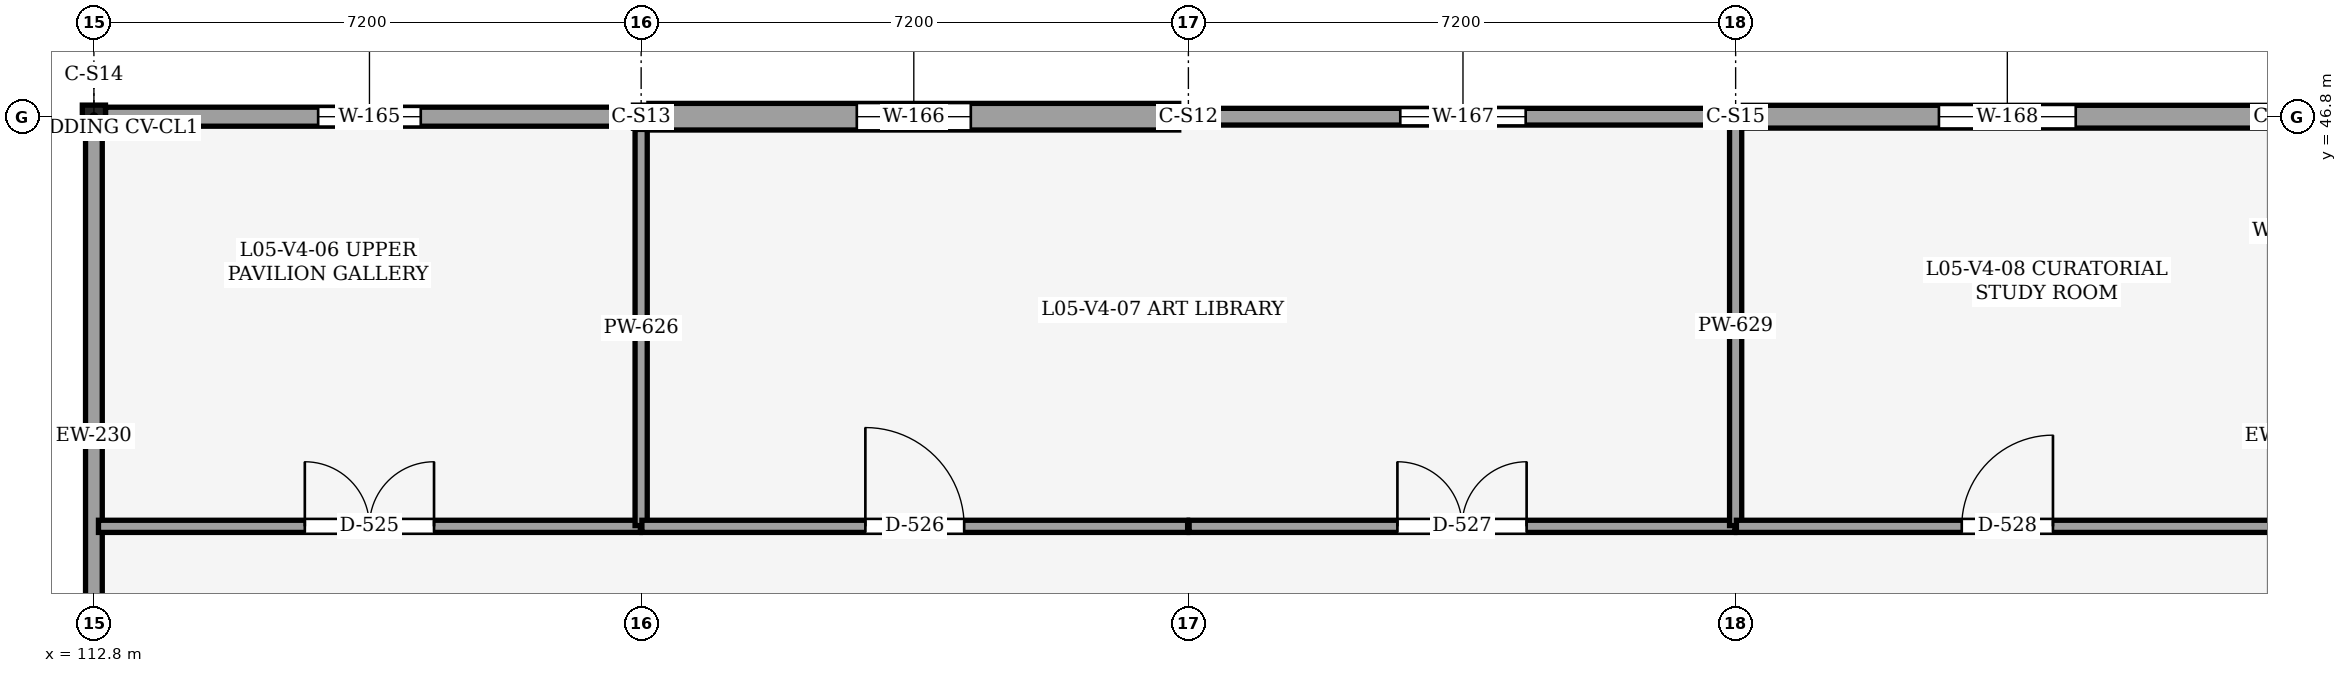
"""IFC4 building model, lengths in metres.
Left out: names, types, materials, properties, quantities, classifications, styles, units other than length and angle.
Written with IfcOpenShell. Run it as: python <this file> out.ifc"""

import sys

from ifc_helpers import new_model, si_unit, direction, frame, frame_2d, origin, origin_2d, place, context, subcontext, project, spatial, rectangle, hollow_rectangle, extrude, element, fill, save


model = new_model("IFC4")
c1 = context("Model", 3, precision=1e-05, world=origin(), true_north=direction((0.0, 1.0)))
c2 = subcontext(c1, "Body", "Model", "MODEL_VIEW")
j1 = project(units=[si_unit("LENGTHUNIT", "METRE"), si_unit("PLANEANGLEUNIT", "RADIAN")], contexts=[c1])
p1 = place(None, origin())
s1 = spatial("IfcSite", under=j1, at=p1, CompositionType="ELEMENT")
p2 = place(p1, origin())
s2 = spatial("IfcBuilding", under=s1, at=p2, CompositionType="ELEMENT")
p3 = place(p2, frame((0.0, 0.0, 24.6)))
s3 = spatial("IfcBuildingStorey", under=s2, at=p3, CompositionType="ELEMENT", Elevation=24.6)
p4 = place(p3, frame((112.8, 46.8, 0.0), z_axis=(0.0, 0.0, 1.0), x_axis=(1.0, 0.0, 0.0)))
e1 = element("IfcColumn", 1, at=p4, inside=s3, PredefinedType="COLUMN", context=c2, shape_type="SweptSolid", body=[
    extrude(hollow_rectangle(XDim=0.305, YDim=0.305, WallThickness=0.016, OuterFilletRadius=0.032, at=origin_2d()), origin(), (0.0, 0.0, 1.0), 4.8),
])
p5 = place(p3, frame((120.0, 46.8, 0.0), z_axis=(0.0, 0.0, 1.0), x_axis=(1.0, 0.0, 0.0)))
e2 = element("IfcColumn", 2, at=p5, inside=s3, PredefinedType="COLUMN", context=c2, shape_type="SweptSolid", body=[
    extrude(hollow_rectangle(XDim=0.203, YDim=0.305, WallThickness=0.013, OuterFilletRadius=0.025, at=origin_2d()), origin(), (0.0, 0.0, 1.0), 4.8),
])
p6 = place(p3, frame((127.2, 46.8, 0.0), z_axis=(0.0, 0.0, 1.0), x_axis=(1.0, 0.0, 0.0)))
e3 = element("IfcColumn", 3, at=p6, inside=s3, PredefinedType="COLUMN", context=c2, shape_type="SweptSolid", body=[
    extrude(hollow_rectangle(XDim=0.254, YDim=0.254, WallThickness=0.013, OuterFilletRadius=0.025, at=origin_2d()), origin(), (0.0, 0.0, 1.0), 4.8),
])
p7 = place(p3, frame((134.4, 46.8, 0.0), z_axis=(0.0, 0.0, 1.0), x_axis=(1.0, 0.0, 0.0)))
e4 = element("IfcColumn", 4, at=p7, inside=s3, PredefinedType="COLUMN", context=c2, shape_type="SweptSolid", body=[
    extrude(hollow_rectangle(XDim=0.203, YDim=0.203, WallThickness=0.013, OuterFilletRadius=0.025, at=origin_2d()), origin(), (0.0, 0.0, 1.0), 4.8),
])
p8 = place(p3, frame((112.952, 46.8, 0.0), z_axis=(0.0, 0.0, 1.0), x_axis=(1.0, 0.0, 0.0)))
e5 = element("IfcWall", 5, at=p8, inside=s3, PredefinedType="SOLIDWALL", context=c2, shape_type="SweptSolid", body=[
    extrude(rectangle(XDim=6.946, YDim=0.25, at=frame_2d((3.473, 0.0))), origin(), (0.0, 0.0, 1.0), 3.695),
])
p9 = place(p8, frame((2.798, 0.0, 0.9)))
e6 = element("IfcOpeningElement", 6, at=p9, cuts=e5, PredefinedType="OPENING", context=c2, shape_type="SweptSolid", body=[
    extrude(rectangle(XDim=1.35, YDim=1.5, at=frame_2d((0.675, 0.75))), frame((0.0, 0.135, 0.0), z_axis=(0.0, -1.0, 0.0), x_axis=(1.0, 0.0, 0.0)), (0.0, 0.0, 1.0), 0.271),
])
p10 = place(p3, frame((120.102, 46.8, 0.0), z_axis=(0.0, 0.0, 1.0), x_axis=(1.0, 0.0, 0.0)))
e7 = element("IfcWall", 7, at=p10, inside=s3, PredefinedType="SOLIDWALL", context=c2, shape_type="SweptSolid", body=[
    extrude(rectangle(XDim=6.971, YDim=0.35, at=frame_2d((3.486, 0.0))), origin(), (0.0, 0.0, 1.0), 3.695),
])
p11 = place(p10, frame((2.736, 0.0, 0.9)))
e8 = element("IfcOpeningElement", 8, at=p11, cuts=e7, PredefinedType="OPENING", context=c2, shape_type="SweptSolid", body=[
    extrude(rectangle(XDim=1.5, YDim=1.5, at=frame_2d((0.75, 0.75))), frame((0.0, 0.185, 0.0), z_axis=(0.0, -1.0, 0.0), x_axis=(1.0, 0.0, 0.0)), (0.0, 0.0, 1.0), 0.371),
])
p12 = place(p3, frame((127.327, 46.8, 0.0), z_axis=(0.0, 0.0, 1.0), x_axis=(1.0, 0.0, 0.0)))
e9 = element("IfcWall", 9, at=p12, inside=s3, PredefinedType="SOLIDWALL", context=c2, shape_type="SweptSolid", body=[
    extrude(rectangle(XDim=6.971, YDim=0.22, at=frame_2d((3.486, 0.0))), origin(), (0.0, 0.0, 1.0), 3.695),
])
p13 = place(p12, frame((2.661, 0.0, 0.9)))
e10 = element("IfcOpeningElement", 10, at=p13, cuts=e9, PredefinedType="OPENING", context=c2, shape_type="SweptSolid", body=[
    extrude(rectangle(XDim=1.65, YDim=1.5, at=frame_2d((0.825, 0.75))), frame((0.0, 0.12, 0.0), z_axis=(0.0, -1.0, 0.0), x_axis=(1.0, 0.0, 0.0)), (0.0, 0.0, 1.0), 0.24),
])
p14 = place(p3, frame((134.502, 46.8, 0.0), z_axis=(0.0, 0.0, 1.0), x_axis=(1.0, 0.0, 0.0)))
e11 = element("IfcWall", 11, at=p14, inside=s3, PredefinedType="SOLIDWALL", context=c2, shape_type="SweptSolid", body=[
    extrude(rectangle(XDim=6.946, YDim=0.3, at=frame_2d((3.473, 0.0))), origin(), (0.0, 0.0, 1.0), 3.695),
])
p15 = place(p14, frame((2.573, 0.0, 0.9)))
e12 = element("IfcOpeningElement", 12, at=p15, cuts=e11, PredefinedType="OPENING", context=c2, shape_type="SweptSolid", body=[
    extrude(rectangle(XDim=1.8, YDim=1.5, at=frame_2d((0.9, 0.75))), frame((0.0, 0.16, 0.0), z_axis=(0.0, -1.0, 0.0), x_axis=(1.0, 0.0, 0.0)), (0.0, 0.0, 1.0), 0.321),
])
p16 = place(p3, frame((112.8, 38.552, 0.0), z_axis=(0.0, 0.0, 1.0), x_axis=(0.0, 1.0, 0.0)))
e13 = element("IfcWall", 13, at=p16, inside=s3, PredefinedType="SOLIDWALL", context=c2, shape_type="SweptSolid", body=[
    extrude(rectangle(XDim=8.095, YDim=0.22, at=frame_2d((4.048, 0.0))), origin(), (0.0, 0.0, 1.0), 4.6),
])
p17 = place(p16, frame((0.75, 0.0, 0.9)))
e14 = element("IfcOpeningElement", 14, at=p17, cuts=e13, PredefinedType="OPENING", context=c2, shape_type="SweptSolid", body=[
    extrude(rectangle(XDim=1.2, YDim=1.5, at=frame_2d((0.6, 0.75))), frame((0.0, 0.12, 0.0), z_axis=(0.0, -1.0, 0.0), x_axis=(1.0, 0.0, 0.0)), (0.0, 0.0, 1.0), 0.24),
])
p18 = place(p3, frame((112.86, 41.41, 0.0), z_axis=(0.0, 0.0, 1.0), x_axis=(1.0, 0.0, 0.0)))
e15 = element("IfcWall", 15, at=p18, inside=s3, PredefinedType="PARTITIONING", context=c2, shape_type="SweptSolid", body=[
    extrude(rectangle(XDim=7.13, YDim=0.16, at=frame_2d((3.565, 0.0))), origin(), (0.0, 0.0, 1.0), 4.58),
])
p19 = place(p18, frame((2.715, 0.0, 0.0)))
e16 = element("IfcOpeningElement", 16, at=p19, cuts=e15, PredefinedType="OPENING", context=c2, shape_type="SweptSolid", body=[
    extrude(rectangle(XDim=1.7, YDim=2.4, at=frame_2d((0.85, 1.2))), frame((0.0, 0.09, 0.0), z_axis=(0.0, -1.0, 0.0), x_axis=(1.0, 0.0, 0.0)), (0.0, 0.0, 1.0), 0.18),
])
p20 = place(p3, frame((120.0, 41.42, 0.0), z_axis=(0.0, 0.0, 1.0), x_axis=(0.0, 1.0, 0.0)))
e17 = element("IfcWall", 17, at=p20, inside=s3, PredefinedType="PARTITIONING", context=c2, shape_type="SweptSolid", body=[
    extrude(rectangle(XDim=5.213, YDim=0.16, at=frame_2d((2.606, 0.0))), origin(), (0.0, 0.0, 1.0), 4.58),
])
p21 = place(p3, frame((120.01, 41.41, 0.0), z_axis=(0.0, 0.0, 1.0), x_axis=(1.0, 0.0, 0.0)))
e18 = element("IfcWall", 18, at=p21, inside=s3, PredefinedType="PARTITIONING", context=c2, shape_type="SweptSolid", body=[
    extrude(rectangle(XDim=7.18, YDim=0.16, at=frame_2d((3.59, 0.0))), origin(), (0.0, 0.0, 1.0), 4.58),
])
p22 = place(p21, frame((2.94, 0.0, 0.0)))
e19 = element("IfcOpeningElement", 19, at=p22, cuts=e18, PredefinedType="OPENING", context=c2, shape_type="SweptSolid", body=[
    extrude(rectangle(XDim=1.3, YDim=2.2, at=frame_2d((0.65, 1.1))), frame((0.0, 0.09, 0.0), z_axis=(0.0, -1.0, 0.0), x_axis=(1.0, 0.0, 0.0)), (0.0, 0.0, 1.0), 0.18),
])
p23 = place(p3, frame((127.21, 41.41, 0.0), z_axis=(0.0, 0.0, 1.0), x_axis=(1.0, 0.0, 0.0)))
e20 = element("IfcWall", 20, at=p23, inside=s3, PredefinedType="PARTITIONING", context=c2, shape_type="SweptSolid", body=[
    extrude(rectangle(XDim=7.18, YDim=0.16, at=frame_2d((3.59, 0.0))), origin(), (0.0, 0.0, 1.0), 4.58),
])
p24 = place(p23, frame((2.74, 0.0, 0.0)))
e21 = element("IfcOpeningElement", 21, at=p24, cuts=e20, PredefinedType="OPENING", context=c2, shape_type="SweptSolid", body=[
    extrude(rectangle(XDim=1.7, YDim=2.4, at=frame_2d((0.85, 1.2))), frame((0.0, 0.09, 0.0), z_axis=(0.0, -1.0, 0.0), x_axis=(1.0, 0.0, 0.0)), (0.0, 0.0, 1.0), 0.18),
])
p25 = place(p3, frame((134.4, 41.42, 0.0), z_axis=(0.0, 0.0, 1.0), x_axis=(0.0, 1.0, 0.0)))
e22 = element("IfcWall", 22, at=p25, inside=s3, PredefinedType="PARTITIONING", context=c2, shape_type="SweptSolid", body=[
    extrude(rectangle(XDim=5.263, YDim=0.16, at=frame_2d((2.632, 0.0))), origin(), (0.0, 0.0, 1.0), 4.58),
])
p26 = place(p3, frame((134.41, 41.41, 0.0), z_axis=(0.0, 0.0, 1.0), x_axis=(1.0, 0.0, 0.0)))
e23 = element("IfcWall", 23, at=p26, inside=s3, PredefinedType="PARTITIONING", context=c2, shape_type="SweptSolid", body=[
    extrude(rectangle(XDim=7.13, YDim=0.16, at=frame_2d((3.565, 0.0))), origin(), (0.0, 0.0, 1.0), 4.58),
])
p27 = place(p26, frame((2.965, 0.0, 0.0)))
e24 = element("IfcOpeningElement", 24, at=p27, cuts=e23, PredefinedType="OPENING", context=c2, shape_type="SweptSolid", body=[
    extrude(rectangle(XDim=1.2, YDim=2.2, at=frame_2d((0.6, 1.1))), frame((0.0, 0.09, 0.0), z_axis=(0.0, -1.0, 0.0), x_axis=(1.0, 0.0, 0.0)), (0.0, 0.0, 1.0), 0.18),
])
p28 = place(p9, origin())
e25 = element("IfcWindow", 25, at=p28, inside=s3, PartitioningType="SINGLE_PANEL", PredefinedType="WINDOW", context=c2, shape_type="SweptSolid", body=[
    extrude(rectangle(XDim=1.35, YDim=1.5, at=frame_2d((0.675, 0.75))), frame((0.0, 0.03, 0.0), z_axis=(0.0, -1.0, 0.0), x_axis=(1.0, 0.0, 0.0)), (0.0, 0.0, 1.0), 0.06),
])
fill(e6, e25)
p29 = place(p11, origin())
e26 = element("IfcWindow", 26, at=p29, inside=s3, PartitioningType="SINGLE_PANEL", PredefinedType="WINDOW", context=c2, shape_type="SweptSolid", body=[
    extrude(rectangle(XDim=1.5, YDim=1.5, at=frame_2d((0.75, 0.75))), frame((0.0, 0.03, 0.0), z_axis=(0.0, -1.0, 0.0), x_axis=(1.0, 0.0, 0.0)), (0.0, 0.0, 1.0), 0.06),
])
fill(e8, e26)
p30 = place(p13, origin())
e27 = element("IfcWindow", 27, at=p30, inside=s3, PartitioningType="SINGLE_PANEL", PredefinedType="WINDOW", context=c2, shape_type="SweptSolid", body=[
    extrude(rectangle(XDim=1.65, YDim=1.5, at=frame_2d((0.825, 0.75))), frame((0.0, 0.03, 0.0), z_axis=(0.0, -1.0, 0.0), x_axis=(1.0, 0.0, 0.0)), (0.0, 0.0, 1.0), 0.06),
])
fill(e10, e27)
p31 = place(p15, origin())
e28 = element("IfcWindow", 28, at=p31, inside=s3, PartitioningType="SINGLE_PANEL", PredefinedType="WINDOW", context=c2, shape_type="SweptSolid", body=[
    extrude(rectangle(XDim=1.8, YDim=1.5, at=frame_2d((0.9, 0.75))), frame((0.0, 0.03, 0.0), z_axis=(0.0, -1.0, 0.0), x_axis=(1.0, 0.0, 0.0)), (0.0, 0.0, 1.0), 0.06),
])
fill(e12, e28)
p32 = place(p19, origin())
e29 = element("IfcDoor", 29, at=p32, inside=s3, OperationType="DOUBLE_DOOR_SINGLE_SWING", PredefinedType="DOOR", context=c2, shape_type="SweptSolid", body=[
    extrude(rectangle(XDim=1.7, YDim=2.4, at=frame_2d((0.85, 1.2))), frame((0.0, 0.025, 0.0), z_axis=(0.0, -1.0, 0.0), x_axis=(1.0, 0.0, 0.0)), (0.0, 0.0, 1.0), 0.05),
])
fill(e16, e29)
p33 = place(p22, origin())
e30 = element("IfcDoor", 30, at=p33, inside=s3, OperationType="SINGLE_SWING_LEFT", PredefinedType="DOOR", context=c2, shape_type="SweptSolid", body=[
    extrude(rectangle(XDim=1.3, YDim=2.2, at=frame_2d((0.65, 1.1))), frame((0.0, 0.025, 0.0), z_axis=(0.0, -1.0, 0.0), x_axis=(1.0, 0.0, 0.0)), (0.0, 0.0, 1.0), 0.05),
])
fill(e19, e30)
p34 = place(p24, origin())
e31 = element("IfcDoor", 31, at=p34, inside=s3, OperationType="DOUBLE_DOOR_SINGLE_SWING", PredefinedType="DOOR", context=c2, shape_type="SweptSolid", body=[
    extrude(rectangle(XDim=1.7, YDim=2.4, at=frame_2d((0.85, 1.2))), frame((0.0, 0.025, 0.0), z_axis=(0.0, -1.0, 0.0), x_axis=(1.0, 0.0, 0.0)), (0.0, 0.0, 1.0), 0.05),
])
fill(e21, e31)
p35 = place(p27, origin())
e32 = element("IfcDoor", 32, at=p35, inside=s3, OperationType="SINGLE_SWING_RIGHT", PredefinedType="DOOR", context=c2, shape_type="SweptSolid", body=[
    extrude(rectangle(XDim=1.2, YDim=2.2, at=frame_2d((0.6, 1.1))), frame((0.0, 0.025, 0.0), z_axis=(0.0, -1.0, 0.0), x_axis=(1.0, 0.0, 0.0)), (0.0, 0.0, 1.0), 0.05),
])
fill(e24, e32)
save(model, sys.argv[1])
